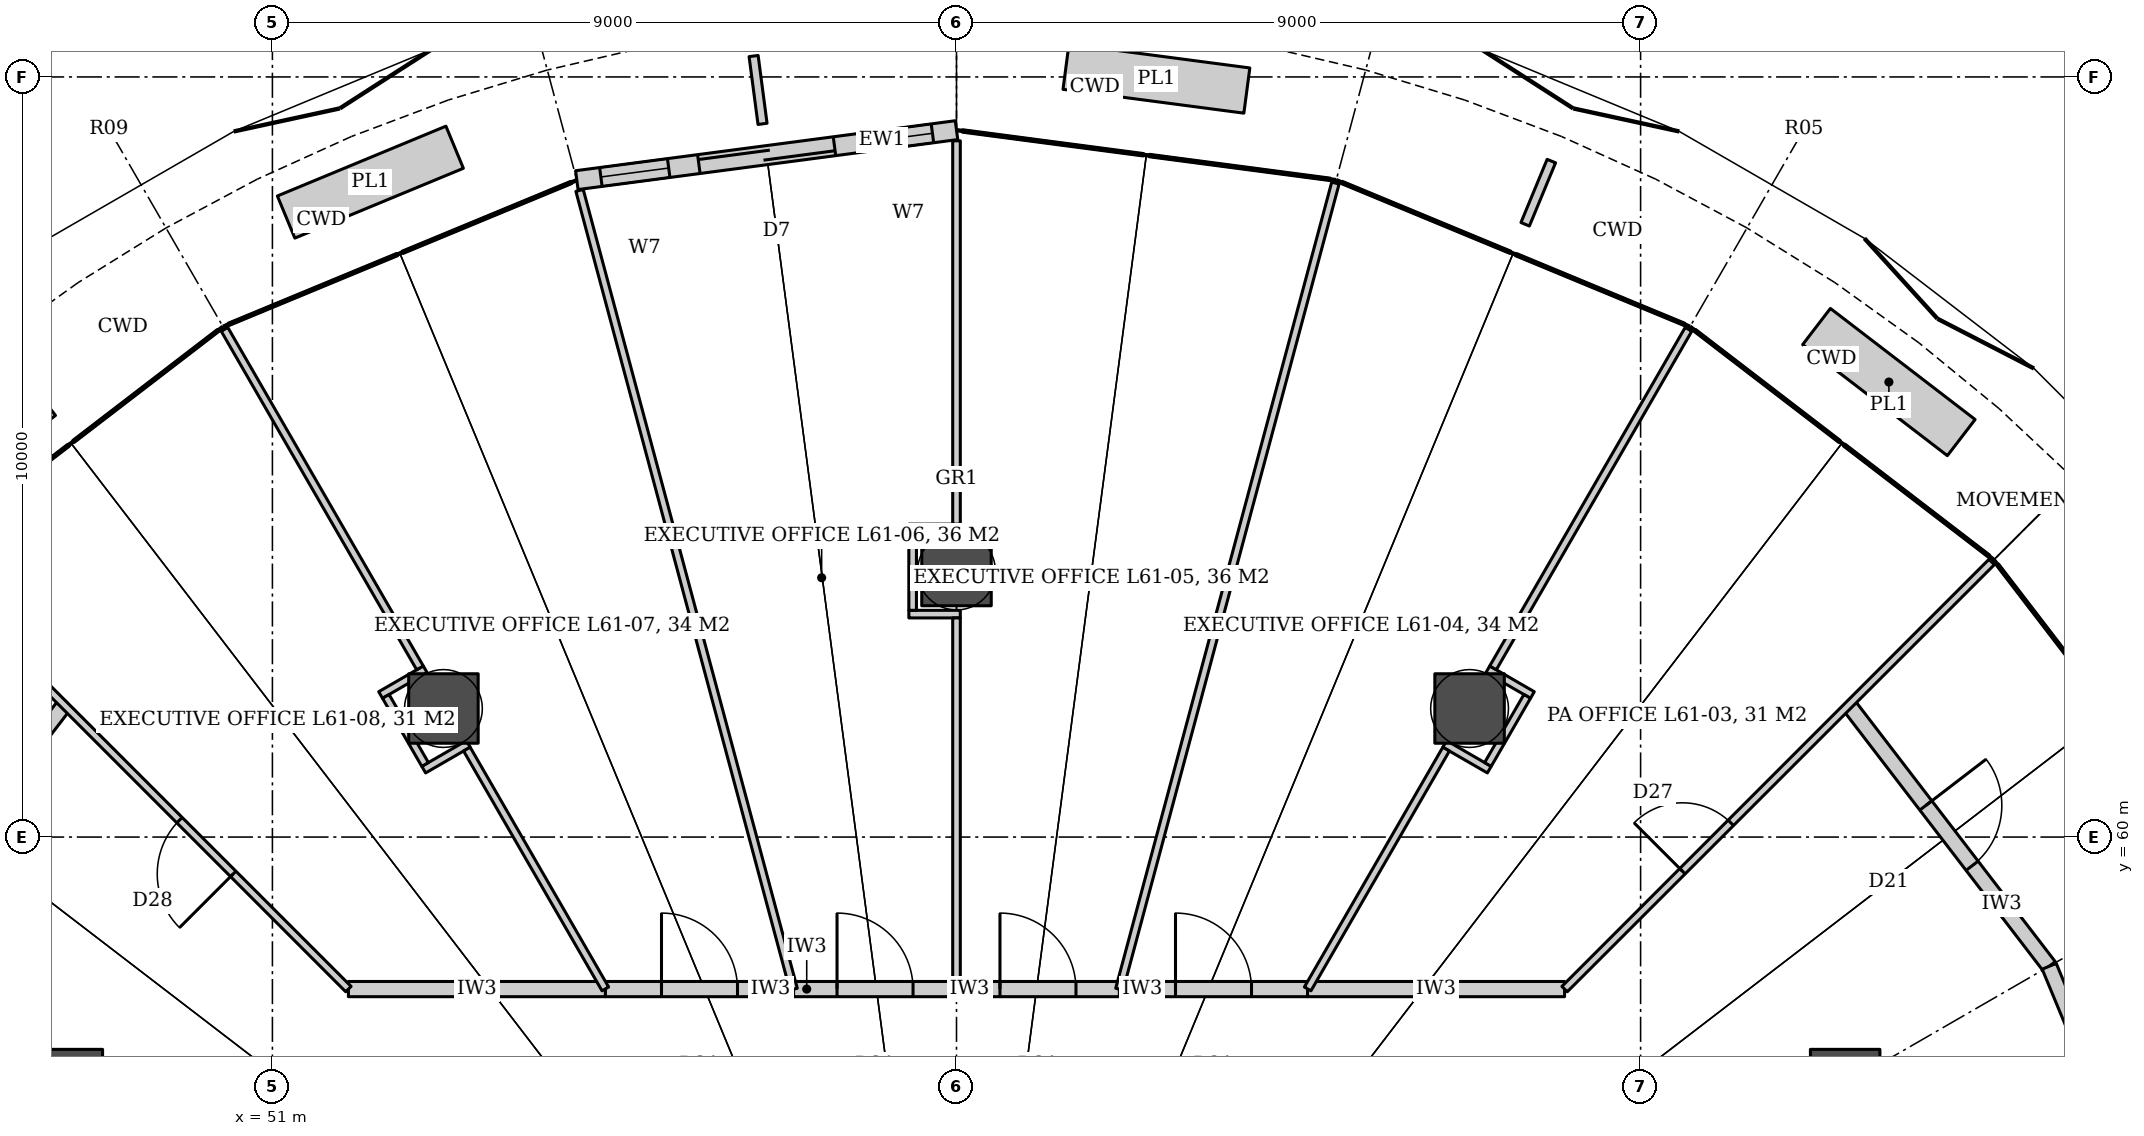
"""IFC4 building model, lengths in metres.
Left out: names, types, materials, properties, quantities, classifications, styles, units other than length and angle.
Written with IfcOpenShell. Run it as: python <this file> out.ifc"""

import sys

from ifc_helpers import new_model, si_unit, direction, frame, frame_2d, origin, origin_2d, place, context, subcontext, project, spatial, rectangle, hollow_circle, extrude, element, fill, save


model = new_model("IFC4")
c1 = context("Model", 3, precision=1e-05, world=origin(), true_north=direction((0.0, 1.0)))
c2 = subcontext(c1, "Body", "Model", "MODEL_VIEW")
j1 = project(units=[si_unit("LENGTHUNIT", "METRE"), si_unit("PLANEANGLEUNIT", "RADIAN")], contexts=[c1])
p1 = place(None, origin())
s1 = spatial("IfcSite", under=j1, at=p1, CompositionType="ELEMENT")
p2 = place(p1, origin())
s2 = spatial("IfcBuilding", under=s1, at=p2, CompositionType="ELEMENT")
p3 = place(p2, frame((0.0, 0.0, 261.2)))
s3 = spatial("IfcBuildingStorey", under=s2, at=p3, CompositionType="ELEMENT", Elevation=261.2)
for number, where, z_axis, x_axis in (
    (1, (71.691, 56.75, 0.0), (0.0, 0.0, 1.0), (1.0, 0.0, 0.0)),
    (2, (66.75, 61.691, 0.0), (0.0, 0.0, 1.0), (1.0, 0.0, 0.0)),
    (3, (60.0, 63.5, 0.0), (0.0, 0.0, 1.0), (1.0, 0.0, 0.0)),
    (4, (53.25, 61.691, 0.0), (0.0, 0.0, 1.0), (1.0, 0.0, 0.0)),
    (5, (48.309, 56.75, 0.0), (0.0, 0.0, 1.0), (1.0, 0.0, 0.0)),
):
    element("IfcColumn", number, at=place(p3, frame(where, z_axis=z_axis, x_axis=x_axis)), inside=s3, PredefinedType="COLUMN", context=c2, shape_type="SweptSolid", body=[
        extrude(hollow_circle(Radius=0.457, WallThickness=0.045, at=origin_2d()), origin(), (0.0, 0.0, 1.0), 4.2),
    ])
p4 = place(p3, frame((46.317, 57.9, 0.0), z_axis=(0.0, 0.0, 1.0), x_axis=(0.608752668552, 0.793360062349, 0.0)))
e6 = element("IfcWall", 6, at=p4, inside=s3, PredefinedType="PARTITIONING", context=c2, shape_type="SweptSolid", body=[
    extrude(rectangle(XDim=4.053, YDim=0.2, at=frame_2d((2.027, 0.0))), origin(), (0.0, 0.0, 1.0), 3.02),
])
p5 = place(p3, frame((48.86, 61.14, 0.0), z_axis=(0.0, 0.0, 1.0), x_axis=(0.707106781187, -0.707106781187, 0.0)))
e7 = element("IfcWall", 7, at=p5, inside=s3, PredefinedType="PARTITIONING", context=c2, shape_type="SweptSolid", body=[
    extrude(rectangle(XDim=4.441, YDim=0.2, at=frame_2d((2.22, 0.0))), origin(), (0.0, 0.0, 1.0), 3.02),
])
p6 = place(p5, frame((1.72, 0.0, 0.0)))
e8 = element("IfcOpeningElement", 8, at=p6, cuts=e7, PredefinedType="OPENING", context=c2, shape_type="SweptSolid", body=[
    extrude(rectangle(XDim=1.0, YDim=2.7, at=frame_2d((0.5, 1.35))), frame((0.0, 0.11, 0.0), z_axis=(0.0, -1.0, 0.0), x_axis=(1.0, 0.0, 0.0)), (0.0, 0.0, 1.0), 0.22),
])
p7 = place(p3, frame((52.0, 58.0, 0.0), z_axis=(0.0, 0.0, 1.0), x_axis=(1.0, 0.0, 0.0)))
e9 = element("IfcWall", 9, at=p7, inside=s3, PredefinedType="PARTITIONING", context=c2, shape_type="SweptSolid", body=[
    extrude(rectangle(XDim=3.381, YDim=0.2, at=frame_2d((1.69, 0.0))), origin(), (0.0, 0.0, 1.0), 3.04),
])
p8 = place(p3, frame((55.381, 58.0, 0.0), z_axis=(0.0, 0.0, 1.0), x_axis=(1.0, 0.0, 0.0)))
e10 = element("IfcWall", 10, at=p8, inside=s3, PredefinedType="PARTITIONING", context=c2, shape_type="SweptSolid", body=[
    extrude(rectangle(XDim=2.475, YDim=0.2, at=frame_2d((1.238, 0.0))), origin(), (0.0, 0.0, 1.0), 3.04),
])
p9 = place(p8, frame((0.738, 0.0, 0.0)))
e11 = element("IfcOpeningElement", 11, at=p9, cuts=e10, PredefinedType="OPENING", context=c2, shape_type="SweptSolid", body=[
    extrude(rectangle(XDim=1.0, YDim=2.7, at=frame_2d((0.5, 1.35))), frame((0.0, 0.11, 0.0), z_axis=(0.0, -1.0, 0.0), x_axis=(1.0, 0.0, 0.0)), (0.0, 0.0, 1.0), 0.22),
])
p10 = place(p3, frame((57.856, 58.0, 0.0), z_axis=(0.0, 0.0, 1.0), x_axis=(1.0, 0.0, 0.0)))
e12 = element("IfcWall", 12, at=p10, inside=s3, PredefinedType="PARTITIONING", context=c2, shape_type="SweptSolid", body=[
    extrude(rectangle(XDim=2.144, YDim=0.2, at=frame_2d((1.072, 0.0))), origin(), (0.0, 0.0, 1.0), 3.04),
])
p11 = place(p10, frame((0.572, 0.0, 0.0)))
e13 = element("IfcOpeningElement", 13, at=p11, cuts=e12, PredefinedType="OPENING", context=c2, shape_type="SweptSolid", body=[
    extrude(rectangle(XDim=1.0, YDim=2.7, at=frame_2d((0.5, 1.35))), frame((0.0, 0.11, 0.0), z_axis=(0.0, -1.0, 0.0), x_axis=(1.0, 0.0, 0.0)), (0.0, 0.0, 1.0), 0.22),
])
p12 = place(p3, frame((60.0, 58.0, 0.0), z_axis=(0.0, 0.0, 1.0), x_axis=(1.0, 0.0, 0.0)))
e14 = element("IfcWall", 14, at=p12, inside=s3, PredefinedType="PARTITIONING", context=c2, shape_type="SweptSolid", body=[
    extrude(rectangle(XDim=2.144, YDim=0.2, at=frame_2d((1.072, 0.0))), origin(), (0.0, 0.0, 1.0), 3.04),
])
p13 = place(p12, frame((0.572, 0.0, 0.0)))
e15 = element("IfcOpeningElement", 15, at=p13, cuts=e14, PredefinedType="OPENING", context=c2, shape_type="SweptSolid", body=[
    extrude(rectangle(XDim=1.0, YDim=2.7, at=frame_2d((0.5, 1.35))), frame((0.0, 0.11, 0.0), z_axis=(0.0, -1.0, 0.0), x_axis=(1.0, 0.0, 0.0)), (0.0, 0.0, 1.0), 0.22),
])
p14 = place(p3, frame((62.144, 58.0, 0.0), z_axis=(0.0, 0.0, 1.0), x_axis=(1.0, 0.0, 0.0)))
e16 = element("IfcWall", 16, at=p14, inside=s3, PredefinedType="PARTITIONING", context=c2, shape_type="SweptSolid", body=[
    extrude(rectangle(XDim=2.475, YDim=0.2, at=frame_2d((1.238, 0.0))), origin(), (0.0, 0.0, 1.0), 3.04),
])
p15 = place(p14, frame((0.738, 0.0, 0.0)))
e17 = element("IfcOpeningElement", 17, at=p15, cuts=e16, PredefinedType="OPENING", context=c2, shape_type="SweptSolid", body=[
    extrude(rectangle(XDim=1.0, YDim=2.7, at=frame_2d((0.5, 1.35))), frame((0.0, 0.11, 0.0), z_axis=(0.0, -1.0, 0.0), x_axis=(1.0, 0.0, 0.0)), (0.0, 0.0, 1.0), 0.22),
])
p16 = place(p3, frame((64.619, 58.0, 0.0), z_axis=(0.0, 0.0, 1.0), x_axis=(1.0, 0.0, 0.0)))
e18 = element("IfcWall", 18, at=p16, inside=s3, PredefinedType="PARTITIONING", context=c2, shape_type="SweptSolid", body=[
    extrude(rectangle(XDim=3.381, YDim=0.2, at=frame_2d((1.69, 0.0))), origin(), (0.0, 0.0, 1.0), 3.04),
])
p17 = place(p3, frame((71.172, 61.172, 0.0), z_axis=(0.0, 0.0, 1.0), x_axis=(0.608714823874, -0.793389099494, 0.0)))
e19 = element("IfcWall", 19, at=p17, inside=s3, PredefinedType="PARTITIONING", context=c2, shape_type="SweptSolid", body=[
    extrude(rectangle(XDim=4.125, YDim=0.2, at=frame_2d((2.062, 0.0))), origin(), (0.0, 0.0, 1.0), 3.02),
])
p18 = place(p3, frame((73.683, 57.9, 0.0), z_axis=(0.0, 0.0, 1.0), x_axis=(0.382731667114, -0.923859551549, 0.0)))
e20 = element("IfcWall", 20, at=p18, inside=s3, PredefinedType="PARTITIONING", context=c2, shape_type="SweptSolid", body=[
    extrude(rectangle(XDim=4.125, YDim=0.2, at=frame_2d((2.062, 0.0))), origin(), (0.0, 0.0, 1.0), 3.02),
])
p19 = place(p3, frame((68.0, 58.0, 0.0), z_axis=(0.0, 0.0, 1.0), x_axis=(0.707106781187, 0.707106781187, 0.0)))
e21 = element("IfcWall", 21, at=p19, inside=s3, PredefinedType="PARTITIONING", context=c2, shape_type="SweptSolid", body=[
    extrude(rectangle(XDim=8.246, YDim=0.1, at=frame_2d((4.123, 0.0))), origin(), (0.0, 0.0, 1.0), 3.02),
])
p20 = place(p19, frame((1.793, 0.0, 0.0)))
e22 = element("IfcOpeningElement", 22, at=p20, cuts=e21, PredefinedType="OPENING", context=c2, shape_type="SweptSolid", body=[
    extrude(rectangle(XDim=0.9, YDim=2.4, at=frame_2d((0.45, 1.2))), frame((0.0, 0.06, 0.0), z_axis=(0.0, -1.0, 0.0), x_axis=(1.0, 0.0, 0.0)), (0.0, 0.0, 1.0), 0.12),
])
for number, where, z_axis, x_axis in (
    (23, (66.51, 61.175, 0.0), (0.0, 0.0, 1.0), (-0.866, 0.5, 0.0)),
    (24, (67.077, 62.157, 0.0), (0.0, 0.0, 1.0), (-0.866, 0.5, 0.0)),
):
    element("IfcWall", number, at=place(p3, frame(where, z_axis=z_axis, x_axis=x_axis)), inside=s3, PredefinedType="PARTITIONING", context=c2, shape_type="SweptSolid", body=[
        extrude(rectangle(XDim=0.677, YDim=0.1, at=frame_2d((0.338, 0.0))), origin(), (0.0, 0.0, 1.0), 3.02),
    ])
p21 = place(p3, frame((65.992, 61.532, 0.0), z_axis=(0.0, 0.0, 1.0), x_axis=(0.500049439734, 0.865996857859, 0.0)))
e25 = element("IfcWall", 25, at=p21, inside=s3, PredefinedType="PARTITIONING", context=c2, shape_type="SweptSolid", body=[
    extrude(rectangle(XDim=1.034, YDim=0.1, at=frame_2d((0.517, 0.0))), origin(), (0.0, 0.0, 1.0), 3.02),
])
p22 = place(p3, frame((64.62, 58.002, 0.0), z_axis=(0.0, 0.0, 1.0), x_axis=(0.499973852758, 0.866040499375, 0.0)))
e26 = element("IfcWall", 26, at=p22, inside=s3, PredefinedType="PARTITIONING", context=c2, shape_type="SweptSolid", body=[
    extrude(rectangle(XDim=3.643, YDim=0.1, at=frame_2d((1.821, 0.0))), origin(), (0.0, 0.0, 1.0), 3.04),
])
p23 = place(p3, frame((67.059, 62.226, 0.0), z_axis=(0.0, 0.0, 1.0), x_axis=(0.499983886315, 0.866034706825, 0.0)))
e27 = element("IfcWall", 27, at=p23, inside=s3, PredefinedType="PARTITIONING", context=c2, shape_type="SweptSolid", body=[
    extrude(rectangle(XDim=5.443, YDim=0.1, at=frame_2d((2.722, 0.0))), origin(), (0.0, 0.0, 1.0), 3.02),
])
p24 = place(p3, frame((62.143, 57.998, 0.0), z_axis=(0.0, 0.0, 1.0), x_axis=(0.258812895948, 0.965927473929, 0.0)))
e28 = element("IfcWall", 28, at=p24, inside=s3, PredefinedType="PARTITIONING", context=c2, shape_type="SweptSolid", body=[
    extrude(rectangle(XDim=11.28, YDim=0.1, at=frame_2d((5.64, 0.0))), origin(), (0.0, 0.0, 1.0), 3.02),
])
for number, where, z_axis, x_axis in (
    (29, (60.05, 62.933, 0.0), (0.0, 0.0, 1.0), (-1.0, 0.0, 0.0)),
    (30, (60.05, 64.067, 0.0), (0.0, 0.0, 1.0), (-1.0, 0.0, 0.0)),
):
    element("IfcWall", number, at=place(p3, frame(where, z_axis=z_axis, x_axis=x_axis)), inside=s3, PredefinedType="PARTITIONING", context=c2, shape_type="SweptSolid", body=[
        extrude(rectangle(XDim=0.677, YDim=0.1, at=frame_2d((0.338, 0.0))), origin(), (0.0, 0.0, 1.0), 3.02),
    ])
p25 = place(p3, frame((59.423, 62.983, 0.0), z_axis=(0.0, 0.0, 1.0), x_axis=(0.0, 1.0, 0.0)))
e31 = element("IfcWall", 31, at=p25, inside=s3, PredefinedType="PARTITIONING", context=c2, shape_type="SweptSolid", body=[
    extrude(rectangle(XDim=1.034, YDim=0.1, at=frame_2d((0.517, 0.0))), origin(), (0.0, 0.0, 1.0), 3.02),
])
p26 = place(p3, frame((60.0, 58.0, 0.0), z_axis=(0.0, 0.0, 1.0), x_axis=(0.0, 1.0, 0.0)))
e32 = element("IfcWall", 32, at=p26, inside=s3, PredefinedType="PARTITIONING", context=c2, shape_type="SweptSolid", body=[
    extrude(rectangle(XDim=4.883, YDim=0.1, at=frame_2d((2.441, 0.0))), origin(), (0.0, 0.0, 1.0), 3.04),
])
p27 = place(p3, frame((60.0, 64.117, 0.0), z_axis=(0.0, 0.0, 1.0), x_axis=(0.0, 1.0, 0.0)))
e33 = element("IfcWall", 33, at=p27, inside=s3, PredefinedType="PARTITIONING", context=c2, shape_type="SweptSolid", body=[
    extrude(rectangle(XDim=5.343, YDim=0.1, at=frame_2d((2.671, 0.0))), origin(), (0.0, 0.0, 1.0), 3.02),
])
p28 = place(p3, frame((57.857, 57.998, 0.0), z_axis=(0.0, 0.0, 1.0), x_axis=(-0.258815038901, 0.965926899739, 0.0)))
e34 = element("IfcWall", 34, at=p28, inside=s3, PredefinedType="PARTITIONING", context=c2, shape_type="SweptSolid", body=[
    extrude(rectangle(XDim=11.18, YDim=0.1, at=frame_2d((5.59, 0.0))), origin(), (0.0, 0.0, 1.0), 3.02),
])
p29 = place(p3, frame((53.577, 61.225, 0.0), z_axis=(0.0, 0.0, 1.0), x_axis=(-0.865993452726, -0.500055336774, 0.0)))
e35 = element("IfcWall", 35, at=p29, inside=s3, PredefinedType="PARTITIONING", context=c2, shape_type="SweptSolid", body=[
    extrude(rectangle(XDim=0.677, YDim=0.1, at=frame_2d((0.339, 0.0))), origin(), (0.0, 0.0, 1.0), 3.02),
])
p30 = place(p3, frame((53.01, 62.208, 0.0), z_axis=(0.0, 0.0, 1.0), x_axis=(-0.865903257996, -0.500211503058, 0.0)))
e36 = element("IfcWall", 36, at=p30, inside=s3, PredefinedType="PARTITIONING", context=c2, shape_type="SweptSolid", body=[
    extrude(rectangle(XDim=0.677, YDim=0.1, at=frame_2d((0.338, 0.0))), origin(), (0.0, 0.0, 1.0), 3.02),
])
p31 = place(p3, frame((53.009, 60.955, 0.0), z_axis=(0.0, 0.0, 1.0), x_axis=(-0.500049439734, 0.865996857859, 0.0)))
e37 = element("IfcWall", 37, at=p31, inside=s3, PredefinedType="PARTITIONING", context=c2, shape_type="SweptSolid", body=[
    extrude(rectangle(XDim=1.034, YDim=0.1, at=frame_2d((0.517, 0.0))), origin(), (0.0, 0.0, 1.0), 3.02),
])
p32 = place(p3, frame((55.38, 58.002, 0.0), z_axis=(0.0, 0.0, 1.0), x_axis=(-0.499973852758, 0.866040499375, 0.0)))
e38 = element("IfcWall", 38, at=p32, inside=s3, PredefinedType="PARTITIONING", context=c2, shape_type="SweptSolid", body=[
    extrude(rectangle(XDim=3.643, YDim=0.1, at=frame_2d((1.821, 0.0))), origin(), (0.0, 0.0, 1.0), 3.04),
])
p33 = place(p3, frame((52.941, 62.226, 0.0), z_axis=(0.0, 0.0, 1.0), x_axis=(-0.499846793097, 0.866113839764, 0.0)))
e39 = element("IfcWall", 39, at=p33, inside=s3, PredefinedType="PARTITIONING", context=c2, shape_type="SweptSolid", body=[
    extrude(rectangle(XDim=1.643, YDim=0.1, at=frame_2d((0.822, 0.0))), origin(), (0.0, 0.0, 1.0), 3.02),
])
p34 = place(p3, frame((60.0, 69.6, 0.0), z_axis=(0.0, 0.0, 1.0), x_axis=(-0.991441622922, -0.130550788349, 0.0)))
e40 = element("IfcWall", 40, at=p34, inside=s3, PredefinedType="SOLIDWALL", context=c2, shape_type="SweptSolid", body=[
    extrude(rectangle(XDim=5.116, YDim=0.25, at=frame_2d((2.558, 0.0))), origin(), (0.0, 0.0, 1.0), 4.04),
])
p35 = place(p34, frame((1.658, 0.0, 0.0)))
e41 = element("IfcOpeningElement", 41, at=p35, cuts=e40, PredefinedType="OPENING", context=c2, shape_type="SweptSolid", body=[
    extrude(rectangle(XDim=1.8, YDim=2.4, at=frame_2d((0.9, 1.2))), frame((0.0, 0.135, 0.0), z_axis=(0.0, -1.0, 0.0), x_axis=(1.0, 0.0, 0.0)), (0.0, 0.0, 1.0), 0.27),
])
p36 = place(p34, frame((0.358, 0.0, 0.0)))
e42 = element("IfcOpeningElement", 42, at=p36, cuts=e40, PredefinedType="OPENING", context=c2, shape_type="SweptSolid", body=[
    extrude(rectangle(XDim=0.9, YDim=2.4, at=frame_2d((0.45, 1.2))), frame((0.0, 0.135, 0.0), z_axis=(0.0, -1.0, 0.0), x_axis=(1.0, 0.0, 0.0)), (0.0, 0.0, 1.0), 0.27),
])
p37 = place(p34, frame((3.858, 0.0, 0.0)))
e43 = element("IfcOpeningElement", 43, at=p37, cuts=e40, PredefinedType="OPENING", context=c2, shape_type="SweptSolid", body=[
    extrude(rectangle(XDim=0.9, YDim=2.4, at=frame_2d((0.45, 1.2))), frame((0.0, 0.135, 0.0), z_axis=(0.0, -1.0, 0.0), x_axis=(1.0, 0.0, 0.0)), (0.0, 0.0, 1.0), 0.27),
])
p38 = place(p20, origin())
e44 = element("IfcDoor", 44, at=p38, inside=s3, OperationType="SINGLE_SWING_LEFT", PredefinedType="DOOR", context=c2, shape_type="SweptSolid", body=[
    extrude(rectangle(XDim=0.9, YDim=2.4, at=frame_2d((0.45, 1.2))), frame((0.0, 0.025, 0.0), z_axis=(0.0, -1.0, 0.0), x_axis=(1.0, 0.0, 0.0)), (0.0, 0.0, 1.0), 0.05),
])
fill(e22, e44)
p39 = place(p15, origin())
e45 = element("IfcDoor", 45, at=p39, inside=s3, OperationType="SINGLE_SWING_LEFT", PredefinedType="DOOR", context=c2, shape_type="SweptSolid", body=[
    extrude(rectangle(XDim=1.0, YDim=2.7, at=frame_2d((0.5, 1.35))), frame((0.0, 0.025, 0.0), z_axis=(0.0, -1.0, 0.0), x_axis=(1.0, 0.0, 0.0)), (0.0, 0.0, 1.0), 0.05),
])
fill(e17, e45)
p40 = place(p13, origin())
e46 = element("IfcDoor", 46, at=p40, inside=s3, OperationType="SINGLE_SWING_LEFT", PredefinedType="DOOR", context=c2, shape_type="SweptSolid", body=[
    extrude(rectangle(XDim=1.0, YDim=2.7, at=frame_2d((0.5, 1.35))), frame((0.0, 0.025, 0.0), z_axis=(0.0, -1.0, 0.0), x_axis=(1.0, 0.0, 0.0)), (0.0, 0.0, 1.0), 0.05),
])
fill(e15, e46)
p41 = place(p11, origin())
e47 = element("IfcDoor", 47, at=p41, inside=s3, OperationType="SINGLE_SWING_LEFT", PredefinedType="DOOR", context=c2, shape_type="SweptSolid", body=[
    extrude(rectangle(XDim=1.0, YDim=2.7, at=frame_2d((0.5, 1.35))), frame((0.0, 0.025, 0.0), z_axis=(0.0, -1.0, 0.0), x_axis=(1.0, 0.0, 0.0)), (0.0, 0.0, 1.0), 0.05),
])
fill(e13, e47)
p42 = place(p9, origin())
e48 = element("IfcDoor", 48, at=p42, inside=s3, OperationType="SINGLE_SWING_LEFT", PredefinedType="DOOR", context=c2, shape_type="SweptSolid", body=[
    extrude(rectangle(XDim=1.0, YDim=2.7, at=frame_2d((0.5, 1.35))), frame((0.0, 0.025, 0.0), z_axis=(0.0, -1.0, 0.0), x_axis=(1.0, 0.0, 0.0)), (0.0, 0.0, 1.0), 0.05),
])
fill(e11, e48)
p43 = place(p6, origin())
e49 = element("IfcDoor", 49, at=p43, inside=s3, OperationType="SINGLE_SWING_LEFT", PredefinedType="DOOR", context=c2, shape_type="SweptSolid", body=[
    extrude(rectangle(XDim=1.0, YDim=2.7, at=frame_2d((0.5, 1.35))), frame((0.0, 0.025, 0.0), z_axis=(0.0, -1.0, 0.0), x_axis=(1.0, 0.0, 0.0)), (0.0, 0.0, 1.0), 0.05),
])
fill(e8, e49)
p44 = place(p35, origin())
e50 = element("IfcDoor", 50, at=p44, inside=s3, OperationType="DOUBLE_DOOR_SLIDING", PredefinedType="DOOR", context=c2, shape_type="SweptSolid", body=[
    extrude(rectangle(XDim=1.8, YDim=2.4, at=frame_2d((0.9, 1.2))), frame((0.0, 0.025, 0.0), z_axis=(0.0, -1.0, 0.0), x_axis=(1.0, 0.0, 0.0)), (0.0, 0.0, 1.0), 0.05),
])
fill(e41, e50)
p45 = place(p36, origin())
e51 = element("IfcWindow", 51, at=p45, inside=s3, PartitioningType="SINGLE_PANEL", PredefinedType="WINDOW", context=c2, shape_type="SweptSolid", body=[
    extrude(rectangle(XDim=0.9, YDim=2.4, at=frame_2d((0.45, 1.2))), frame((0.0, 0.03, 0.0), z_axis=(0.0, -1.0, 0.0), x_axis=(1.0, 0.0, 0.0)), (0.0, 0.0, 1.0), 0.06),
])
fill(e42, e51)
p46 = place(p37, origin())
e52 = element("IfcWindow", 52, at=p46, inside=s3, PartitioningType="SINGLE_PANEL", PredefinedType="WINDOW", context=c2, shape_type="SweptSolid", body=[
    extrude(rectangle(XDim=0.9, YDim=2.4, at=frame_2d((0.45, 1.2))), frame((0.0, 0.03, 0.0), z_axis=(0.0, -1.0, 0.0), x_axis=(1.0, 0.0, 0.0)), (0.0, 0.0, 1.0), 0.06),
])
fill(e43, e52)
save(model, sys.argv[1])
